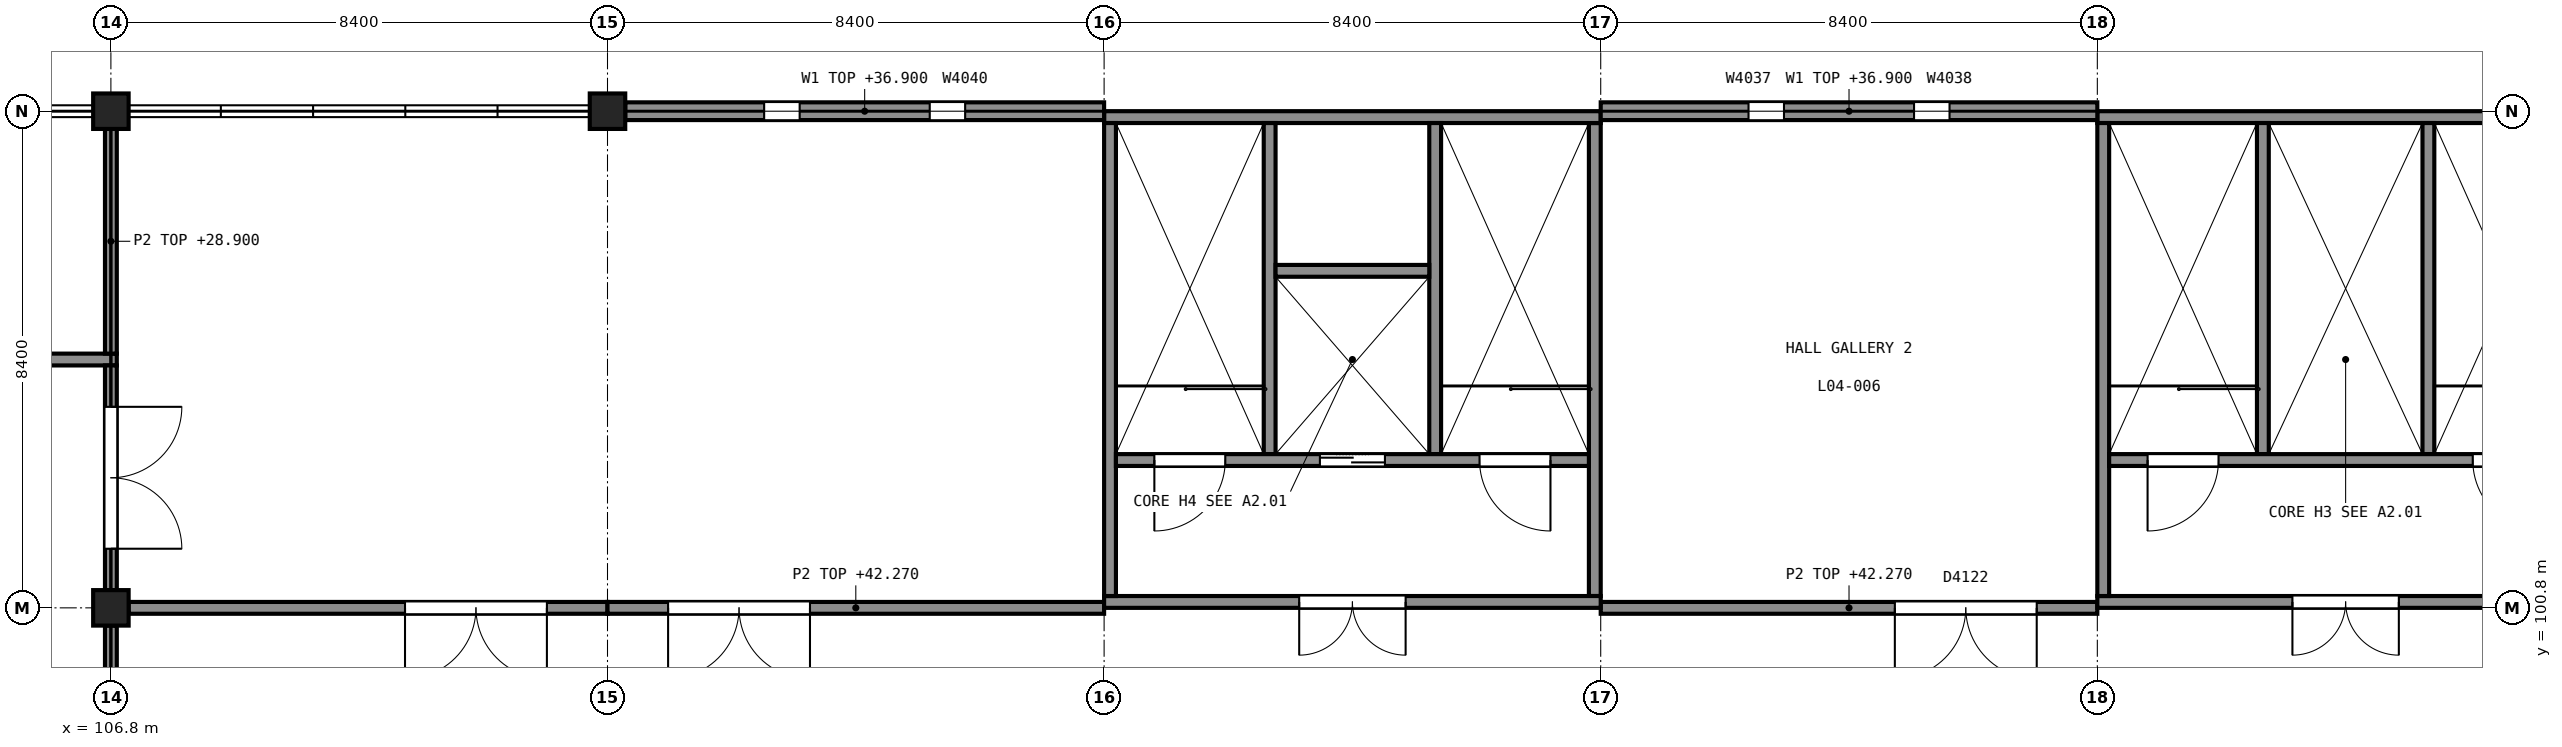
"""IFC4 building model, lengths in metres.
Left out: names, types, materials, properties, quantities, classifications, styles, units other than length and angle.
Written with IfcOpenShell. Run it as: python <this file> out.ifc"""

import sys

from ifc_helpers import new_model, si_unit, direction, frame, frame_2d, origin, origin_2d, place, context, subcontext, project, spatial, rectangle, extrude, element, fill, save


model = new_model("IFC4")
c1 = context("Model", 3, precision=1e-05, world=origin(), true_north=direction((0.0, 1.0)))
c2 = subcontext(c1, "Body", "Model", "MODEL_VIEW")
j1 = project(units=[si_unit("LENGTHUNIT", "METRE"), si_unit("PLANEANGLEUNIT", "RADIAN")], contexts=[c1])
p1 = place(None, origin())
s1 = spatial("IfcSite", under=j1, at=p1, CompositionType="ELEMENT")
p2 = place(p1, origin())
s2 = spatial("IfcBuilding", under=s1, at=p2, CompositionType="ELEMENT")
p3 = place(p2, frame((0.0, 0.0, 25.0)))
s3 = spatial("IfcBuildingStorey", under=s2, at=p3, CompositionType="ELEMENT", Elevation=25.0)
p4 = place(p3, frame((140.4, 100.9, 0.0), z_axis=(0.0, 0.0, 1.0), x_axis=(1.0, 0.0, 0.0)))
e1 = element("IfcWall", 1, at=p4, inside=s3, PredefinedType="SHEAR", context=c2, shape_type="SweptSolid", body=[
    extrude(rectangle(XDim=8.4, YDim=0.2, at=frame_2d((4.2, 0.0))), origin(), (0.0, 0.0, 1.0), 23.29),
])
p5 = place(p4, frame((3.3, 0.0, 0.0)))
e2 = element("IfcOpeningElement", 2, at=p5, cuts=e1, PredefinedType="OPENING", context=c2, shape_type="SweptSolid", body=[
    extrude(rectangle(XDim=1.8, YDim=2.1, at=frame_2d((0.9, 1.05))), frame((0.0, 0.11, 0.0), z_axis=(0.0, -1.0, 0.0), x_axis=(1.0, 0.0, 0.0)), (0.0, 0.0, 1.0), 0.22),
])
p6 = place(p3, frame((140.4, 109.1, 0.0), z_axis=(0.0, 0.0, 1.0), x_axis=(1.0, 0.0, 0.0)))
e3 = element("IfcWall", 3, at=p6, inside=s3, PredefinedType="SHEAR", context=c2, shape_type="SweptSolid", body=[
    extrude(rectangle(XDim=8.4, YDim=0.2, at=frame_2d((4.2, 0.0))), origin(), (0.0, 0.0, 1.0), 23.29),
])
p7 = place(p3, frame((140.5, 101.0, 0.0), z_axis=(0.0, 0.0, 1.0), x_axis=(0.0, 1.0, 0.0)))
e4 = element("IfcWall", 4, at=p7, inside=s3, PredefinedType="SHEAR", context=c2, shape_type="SweptSolid", body=[
    extrude(rectangle(XDim=8.0, YDim=0.2, at=frame_2d((4.0, 0.0))), origin(), (0.0, 0.0, 1.0), 23.29),
])
p8 = place(p3, frame((140.6, 103.3, 0.0), z_axis=(0.0, 0.0, 1.0), x_axis=(1.0, 0.0, 0.0)))
e5 = element("IfcWall", 5, at=p8, inside=s3, PredefinedType="SHEAR", context=c2, shape_type="SweptSolid", body=[
    extrude(rectangle(XDim=8.0, YDim=0.2, at=frame_2d((4.0, 0.0))), origin(), (0.0, 0.0, 1.0), 23.29),
])
p9 = place(p8, frame((0.65, 0.0, 0.0)))
e6 = element("IfcOpeningElement", 6, at=p9, cuts=e5, PredefinedType="OPENING", context=c2, shape_type="SweptSolid", body=[
    extrude(rectangle(XDim=1.2, YDim=2.1, at=frame_2d((0.6, 1.05))), frame((0.0, 0.11, 0.0), z_axis=(0.0, -1.0, 0.0), x_axis=(1.0, 0.0, 0.0)), (0.0, 0.0, 1.0), 0.22),
])
p10 = place(p8, frame((6.15, 0.0, 0.0)))
e7 = element("IfcOpeningElement", 7, at=p10, cuts=e5, PredefinedType="OPENING", context=c2, shape_type="SweptSolid", body=[
    extrude(rectangle(XDim=1.2, YDim=2.1, at=frame_2d((0.6, 1.05))), frame((0.0, 0.11, 0.0), z_axis=(0.0, -1.0, 0.0), x_axis=(1.0, 0.0, 0.0)), (0.0, 0.0, 1.0), 0.22),
])
for number, where, z_axis, x_axis in (
    (8, (143.2, 103.4, 0.0), (0.0, 0.0, 1.0), (0.0, 1.0, 0.0)),
    (9, (146.0, 103.4, 0.0), (0.0, 0.0, 1.0), (0.0, 1.0, 0.0)),
):
    element("IfcWall", number, at=place(p3, frame(where, z_axis=z_axis, x_axis=x_axis)), inside=s3, PredefinedType="SHEAR", context=c2, shape_type="SweptSolid", body=[
        extrude(rectangle(XDim=5.6, YDim=0.2, at=frame_2d((2.8, 0.0))), origin(), (0.0, 0.0, 1.0), 23.29),
    ])
p11 = place(p3, frame((123.6, 100.9, 0.0), z_axis=(0.0, 0.0, 1.0), x_axis=(1.0, 0.0, 0.0)))
e10 = element("IfcWall", 10, at=p11, inside=s3, PredefinedType="SHEAR", context=c2, shape_type="SweptSolid", body=[
    extrude(rectangle(XDim=8.4, YDim=0.2, at=frame_2d((4.2, 0.0))), origin(), (0.0, 0.0, 1.0), 23.29),
])
p12 = place(p11, frame((3.3, 0.0, 0.0)))
e11 = element("IfcOpeningElement", 11, at=p12, cuts=e10, PredefinedType="OPENING", context=c2, shape_type="SweptSolid", body=[
    extrude(rectangle(XDim=1.8, YDim=2.1, at=frame_2d((0.9, 1.05))), frame((0.0, 0.11, 0.0), z_axis=(0.0, -1.0, 0.0), x_axis=(1.0, 0.0, 0.0)), (0.0, 0.0, 1.0), 0.22),
])
p13 = place(p3, frame((123.6, 109.1, 0.0), z_axis=(0.0, 0.0, 1.0), x_axis=(1.0, 0.0, 0.0)))
e12 = element("IfcWall", 12, at=p13, inside=s3, PredefinedType="SHEAR", context=c2, shape_type="SweptSolid", body=[
    extrude(rectangle(XDim=8.4, YDim=0.2, at=frame_2d((4.2, 0.0))), origin(), (0.0, 0.0, 1.0), 23.29),
])
for number, where, z_axis, x_axis in (
    (13, (123.7, 101.0, 0.0), (0.0, 0.0, 1.0), (0.0, 1.0, 0.0)),
    (14, (131.9, 101.0, 0.0), (0.0, 0.0, 1.0), (0.0, 1.0, 0.0)),
):
    element("IfcWall", number, at=place(p3, frame(where, z_axis=z_axis, x_axis=x_axis)), inside=s3, PredefinedType="SHEAR", context=c2, shape_type="SweptSolid", body=[
        extrude(rectangle(XDim=8.0, YDim=0.2, at=frame_2d((4.0, 0.0))), origin(), (0.0, 0.0, 1.0), 23.29),
    ])
p14 = place(p3, frame((123.8, 103.3, 0.0), z_axis=(0.0, 0.0, 1.0), x_axis=(1.0, 0.0, 0.0)))
e15 = element("IfcWall", 15, at=p14, inside=s3, PredefinedType="SHEAR", context=c2, shape_type="SweptSolid", body=[
    extrude(rectangle(XDim=8.0, YDim=0.2, at=frame_2d((4.0, 0.0))), origin(), (0.0, 0.0, 1.0), 23.29),
])
p15 = place(p14, frame((0.65, 0.0, 0.0)))
e16 = element("IfcOpeningElement", 16, at=p15, cuts=e15, PredefinedType="OPENING", context=c2, shape_type="SweptSolid", body=[
    extrude(rectangle(XDim=1.2, YDim=2.1, at=frame_2d((0.6, 1.05))), frame((0.0, 0.11, 0.0), z_axis=(0.0, -1.0, 0.0), x_axis=(1.0, 0.0, 0.0)), (0.0, 0.0, 1.0), 0.22),
])
p16 = place(p14, frame((6.15, 0.0, 0.0)))
e17 = element("IfcOpeningElement", 17, at=p16, cuts=e15, PredefinedType="OPENING", context=c2, shape_type="SweptSolid", body=[
    extrude(rectangle(XDim=1.2, YDim=2.1, at=frame_2d((0.6, 1.05))), frame((0.0, 0.11, 0.0), z_axis=(0.0, -1.0, 0.0), x_axis=(1.0, 0.0, 0.0)), (0.0, 0.0, 1.0), 0.22),
])
p17 = place(p14, frame((3.45, 0.0, 0.0)))
e18 = element("IfcOpeningElement", 18, at=p17, cuts=e15, PredefinedType="OPENING", context=c2, shape_type="SweptSolid", body=[
    extrude(rectangle(XDim=1.1, YDim=2.1, at=frame_2d((0.55, 1.05))), frame((0.0, 0.11, 0.0), z_axis=(0.0, -1.0, 0.0), x_axis=(1.0, 0.0, 0.0)), (0.0, 0.0, 1.0), 0.22),
])
for number, where, z_axis, x_axis in (
    (19, (126.4, 103.4, 0.0), (0.0, 0.0, 1.0), (0.0, 1.0, 0.0)),
    (20, (129.2, 103.4, 0.0), (0.0, 0.0, 1.0), (0.0, 1.0, 0.0)),
):
    element("IfcWall", number, at=place(p3, frame(where, z_axis=z_axis, x_axis=x_axis)), inside=s3, PredefinedType="SHEAR", context=c2, shape_type="SweptSolid", body=[
        extrude(rectangle(XDim=5.6, YDim=0.2, at=frame_2d((2.8, 0.0))), origin(), (0.0, 0.0, 1.0), 23.29),
    ])
p18 = place(p3, frame((126.5, 106.5, 0.0), z_axis=(0.0, 0.0, 1.0), x_axis=(1.0, 0.0, 0.0)))
e21 = element("IfcWall", 21, at=p18, inside=s3, PredefinedType="SHEAR", context=c2, shape_type="SweptSolid", body=[
    extrude(rectangle(XDim=2.6, YDim=0.2, at=frame_2d((1.3, 0.0))), origin(), (0.0, 0.0, 1.0), 23.29),
])
for number, where, z_axis, x_axis in (
    (22, (106.8, 100.8, 0.0), (0.0, 0.0, 1.0), (1.0, 0.0, 0.0)),
    (23, (106.8, 109.2, 0.0), (0.0, 0.0, 1.0), (1.0, 0.0, 0.0)),
    (24, (115.2, 109.2, 0.0), (0.0, 0.0, 1.0), (1.0, 0.0, 0.0)),
):
    element("IfcColumn", number, at=place(p3, frame(where, z_axis=z_axis, x_axis=x_axis)), inside=s3, PredefinedType="COLUMN", context=c2, shape_type="SweptSolid", body=[
        extrude(rectangle(XDim=0.6, YDim=0.6, at=origin_2d()), origin(), (0.0, 0.0, 1.0), 5.0),
    ])
p19 = place(p3, frame((132.0, 109.2, 0.0), z_axis=(0.0, 0.0, 1.0), x_axis=(1.0, 0.0, 0.0)))
e25 = element("IfcWall", 25, at=p19, inside=s3, PredefinedType="SOLIDWALL", context=c2, shape_type="SweptSolid", body=[
    extrude(rectangle(XDim=8.4, YDim=0.3, at=frame_2d((4.2, 0.0))), origin(), (0.0, 0.0, 1.0), 11.9),
])
p20 = place(p19, frame((2.5, 0.0, 1.5)))
e26 = element("IfcOpeningElement", 26, at=p20, cuts=e25, PredefinedType="OPENING", context=c2, shape_type="SweptSolid", body=[
    extrude(rectangle(XDim=0.6, YDim=2.4, at=frame_2d((0.3, 1.2))), frame((0.0, 0.16, 0.0), z_axis=(0.0, -1.0, 0.0), x_axis=(1.0, 0.0, 0.0)), (0.0, 0.0, 1.0), 0.32),
])
p21 = place(p19, frame((5.3, 0.0, 1.5)))
e27 = element("IfcOpeningElement", 27, at=p21, cuts=e25, PredefinedType="OPENING", context=c2, shape_type="SweptSolid", body=[
    extrude(rectangle(XDim=0.6, YDim=2.4, at=frame_2d((0.3, 1.2))), frame((0.0, 0.16, 0.0), z_axis=(0.0, -1.0, 0.0), x_axis=(1.0, 0.0, 0.0)), (0.0, 0.0, 1.0), 0.32),
])
p22 = place(p3, frame((115.5, 109.2, 0.0), z_axis=(0.0, 0.0, 1.0), x_axis=(1.0, 0.0, 0.0)))
e28 = element("IfcWall", 28, at=p22, inside=s3, PredefinedType="SOLIDWALL", context=c2, shape_type="SweptSolid", body=[
    extrude(rectangle(XDim=8.1, YDim=0.3, at=frame_2d((4.05, 0.0))), origin(), (0.0, 0.0, 1.0), 11.9),
])
p23 = place(p22, frame((2.35, 0.0, 1.5)))
e29 = element("IfcOpeningElement", 29, at=p23, cuts=e28, PredefinedType="OPENING", context=c2, shape_type="SweptSolid", body=[
    extrude(rectangle(XDim=0.6, YDim=2.4, at=frame_2d((0.3, 1.2))), frame((0.0, 0.16, 0.0), z_axis=(0.0, -1.0, 0.0), x_axis=(1.0, 0.0, 0.0)), (0.0, 0.0, 1.0), 0.32),
])
p24 = place(p22, frame((5.15, 0.0, 1.5)))
e30 = element("IfcOpeningElement", 30, at=p24, cuts=e28, PredefinedType="OPENING", context=c2, shape_type="SweptSolid", body=[
    extrude(rectangle(XDim=0.6, YDim=2.4, at=frame_2d((0.3, 1.2))), frame((0.0, 0.16, 0.0), z_axis=(0.0, -1.0, 0.0), x_axis=(1.0, 0.0, 0.0)), (0.0, 0.0, 1.0), 0.32),
])
p25 = place(p3, frame((98.4, 105.0, 0.0), z_axis=(0.0, 0.0, 1.0), x_axis=(1.0, 0.0, 0.0)))
e31 = element("IfcWall", 31, at=p25, inside=s3, PredefinedType="PARTITIONING", context=c2, shape_type="SweptSolid", body=[
    extrude(rectangle(XDim=8.5, YDim=0.2, at=frame_2d((4.25, 0.0))), origin(), (0.0, 0.0, 1.0), 3.9),
])
p26 = place(p25, frame((1.6, 0.0, 0.0)))
e32 = element("IfcOpeningElement", 32, at=p26, cuts=e31, PredefinedType="OPENING", context=c2, shape_type="SweptSolid", body=[
    extrude(rectangle(XDim=1.0, YDim=2.1, at=frame_2d((0.5, 1.05))), frame((0.0, 0.11, 0.0), z_axis=(0.0, -1.0, 0.0), x_axis=(1.0, 0.0, 0.0)), (0.0, 0.0, 1.0), 0.22),
])
p27 = place(p25, frame((5.788, 0.0, 0.0)))
e33 = element("IfcOpeningElement", 33, at=p27, cuts=e31, PredefinedType="OPENING", context=c2, shape_type="SweptSolid", body=[
    extrude(rectangle(XDim=1.0, YDim=2.1, at=frame_2d((0.5, 1.05))), frame((0.0, 0.11, 0.0), z_axis=(0.0, -1.0, 0.0), x_axis=(1.0, 0.0, 0.0)), (0.0, 0.0, 1.0), 0.22),
])
p28 = place(p3, frame((106.8, 101.1, 0.0), z_axis=(0.0, 0.0, 1.0), x_axis=(0.0, 1.0, 0.0)))
e34 = element("IfcWall", 34, at=p28, inside=s3, PredefinedType="PARTITIONING", context=c2, shape_type="SweptSolid", body=[
    extrude(rectangle(XDim=3.8, YDim=0.2, at=frame_2d((1.9, 0.0))), origin(), (0.0, 0.0, 1.0), 3.9),
])
p29 = place(p28, frame((0.7, 0.0, 0.0)))
e35 = element("IfcOpeningElement", 35, at=p29, cuts=e34, PredefinedType="OPENING", context=c2, shape_type="SweptSolid", body=[
    extrude(rectangle(XDim=2.4, YDim=2.4, at=frame_2d((1.2, 1.2))), frame((0.0, 0.11, 0.0), z_axis=(0.0, -1.0, 0.0), x_axis=(1.0, 0.0, 0.0)), (0.0, 0.0, 1.0), 0.22),
])
p30 = place(p3, frame((106.8, 105.1, 0.0), z_axis=(0.0, 0.0, 1.0), x_axis=(0.0, 1.0, 0.0)))
e36 = element("IfcWall", 36, at=p30, inside=s3, PredefinedType="PARTITIONING", context=c2, shape_type="SweptSolid", body=[
    extrude(rectangle(XDim=3.8, YDim=0.2, at=frame_2d((1.9, 0.0))), origin(), (0.0, 0.0, 1.0), 3.9),
])
p31 = place(p3, frame((107.1, 100.8, 0.0), z_axis=(0.0, 0.0, 1.0), x_axis=(1.0, 0.0, 0.0)))
e37 = element("IfcWall", 37, at=p31, inside=s3, PredefinedType="PARTITIONING", context=c2, shape_type="SweptSolid", body=[
    extrude(rectangle(XDim=8.1, YDim=0.2, at=frame_2d((4.05, 0.0))), origin(), (0.0, 0.0, 1.0), 17.27),
])
p32 = place(p31, frame((4.675, 0.0, 0.0)))
e38 = element("IfcOpeningElement", 38, at=p32, cuts=e37, PredefinedType="OPENING", context=c2, shape_type="SweptSolid", body=[
    extrude(rectangle(XDim=2.4, YDim=2.4, at=frame_2d((1.2, 1.2))), frame((0.0, 0.11, 0.0), z_axis=(0.0, -1.0, 0.0), x_axis=(1.0, 0.0, 0.0)), (0.0, 0.0, 1.0), 0.22),
])
p33 = place(p3, frame((115.2, 100.8, 0.0), z_axis=(0.0, 0.0, 1.0), x_axis=(1.0, 0.0, 0.0)))
e39 = element("IfcWall", 39, at=p33, inside=s3, PredefinedType="PARTITIONING", context=c2, shape_type="SweptSolid", body=[
    extrude(rectangle(XDim=8.4, YDim=0.2, at=frame_2d((4.2, 0.0))), origin(), (0.0, 0.0, 1.0), 17.27),
])
p34 = place(p33, frame((1.025, 0.0, 0.0)))
e40 = element("IfcOpeningElement", 40, at=p34, cuts=e39, PredefinedType="OPENING", context=c2, shape_type="SweptSolid", body=[
    extrude(rectangle(XDim=2.4, YDim=2.4, at=frame_2d((1.2, 1.2))), frame((0.0, 0.11, 0.0), z_axis=(0.0, -1.0, 0.0), x_axis=(1.0, 0.0, 0.0)), (0.0, 0.0, 1.0), 0.22),
])
p35 = place(p3, frame((132.0, 100.8, 0.0), z_axis=(0.0, 0.0, 1.0), x_axis=(1.0, 0.0, 0.0)))
e41 = element("IfcWall", 41, at=p35, inside=s3, PredefinedType="PARTITIONING", context=c2, shape_type="SweptSolid", body=[
    extrude(rectangle(XDim=8.4, YDim=0.2, at=frame_2d((4.2, 0.0))), origin(), (0.0, 0.0, 1.0), 17.27),
])
p36 = place(p35, frame((4.975, 0.0, 0.0)))
e42 = element("IfcOpeningElement", 42, at=p36, cuts=e41, PredefinedType="OPENING", context=c2, shape_type="SweptSolid", body=[
    extrude(rectangle(XDim=2.4, YDim=2.4, at=frame_2d((1.2, 1.2))), frame((0.0, 0.11, 0.0), z_axis=(0.0, -1.0, 0.0), x_axis=(1.0, 0.0, 0.0)), (0.0, 0.0, 1.0), 0.22),
])
p37 = place(p3, frame((106.8, 92.7, 0.0), z_axis=(0.0, 0.0, 1.0), x_axis=(0.0, 1.0, 0.0)))
e43 = element("IfcWall", 43, at=p37, inside=s3, PredefinedType="PARTITIONING", context=c2, shape_type="SweptSolid", body=[
    extrude(rectangle(XDim=7.8, YDim=0.2, at=frame_2d((3.9, 0.0))), origin(), (0.0, 0.0, 1.0), 3.9),
])
p38 = place(p20, origin())
e44 = element("IfcWindow", 44, at=p38, inside=s3, PartitioningType="SINGLE_PANEL", PredefinedType="WINDOW", context=c2, shape_type="SweptSolid", body=[
    extrude(rectangle(XDim=0.6, YDim=2.4, at=frame_2d((0.3, 1.2))), frame((0.0, -0.07, 0.0), z_axis=(0.0, -1.0, 0.0), x_axis=(1.0, 0.0, 0.0)), (0.0, 0.0, 1.0), 0.06),
])
fill(e26, e44)
p39 = place(p21, origin())
e45 = element("IfcWindow", 45, at=p39, inside=s3, PartitioningType="SINGLE_PANEL", PredefinedType="WINDOW", context=c2, shape_type="SweptSolid", body=[
    extrude(rectangle(XDim=0.6, YDim=2.4, at=frame_2d((0.3, 1.2))), frame((0.0, -0.07, 0.0), z_axis=(0.0, -1.0, 0.0), x_axis=(1.0, 0.0, 0.0)), (0.0, 0.0, 1.0), 0.06),
])
fill(e27, e45)
p40 = place(p23, origin())
e46 = element("IfcWindow", 46, at=p40, inside=s3, PartitioningType="SINGLE_PANEL", PredefinedType="WINDOW", context=c2, shape_type="SweptSolid", body=[
    extrude(rectangle(XDim=0.6, YDim=2.4, at=frame_2d((0.3, 1.2))), frame((0.0, -0.07, 0.0), z_axis=(0.0, -1.0, 0.0), x_axis=(1.0, 0.0, 0.0)), (0.0, 0.0, 1.0), 0.06),
])
fill(e29, e46)
p41 = place(p24, origin())
e47 = element("IfcWindow", 47, at=p41, inside=s3, PartitioningType="SINGLE_PANEL", PredefinedType="WINDOW", context=c2, shape_type="SweptSolid", body=[
    extrude(rectangle(XDim=0.6, YDim=2.4, at=frame_2d((0.3, 1.2))), frame((0.0, -0.07, 0.0), z_axis=(0.0, -1.0, 0.0), x_axis=(1.0, 0.0, 0.0)), (0.0, 0.0, 1.0), 0.06),
])
fill(e30, e47)
p42 = place(p29, origin())
e48 = element("IfcDoor", 48, at=p42, inside=s3, OperationType="DOUBLE_DOOR_SINGLE_SWING", PredefinedType="DOOR", context=c2, shape_type="SweptSolid", body=[
    extrude(rectangle(XDim=2.4, YDim=2.4, at=frame_2d((1.2, 1.2))), frame((0.0, 0.025, 0.0), z_axis=(0.0, -1.0, 0.0), x_axis=(1.0, 0.0, 0.0)), (0.0, 0.0, 1.0), 0.05),
])
fill(e35, e48)
p43 = place(p32, origin())
e49 = element("IfcDoor", 49, at=p43, inside=s3, OperationType="DOUBLE_DOOR_SINGLE_SWING", PredefinedType="DOOR", context=c2, shape_type="SweptSolid", body=[
    extrude(rectangle(XDim=2.4, YDim=2.4, at=frame_2d((1.2, 1.2))), frame((0.0, 0.025, 0.0), z_axis=(0.0, -1.0, 0.0), x_axis=(1.0, 0.0, 0.0)), (0.0, 0.0, 1.0), 0.05),
])
fill(e38, e49)
p44 = place(p34, origin())
e50 = element("IfcDoor", 50, at=p44, inside=s3, OperationType="DOUBLE_DOOR_SINGLE_SWING", PredefinedType="DOOR", context=c2, shape_type="SweptSolid", body=[
    extrude(rectangle(XDim=2.4, YDim=2.4, at=frame_2d((1.2, 1.2))), frame((0.0, 0.025, 0.0), z_axis=(0.0, -1.0, 0.0), x_axis=(1.0, 0.0, 0.0)), (0.0, 0.0, 1.0), 0.05),
])
fill(e40, e50)
p45 = place(p36, origin())
e51 = element("IfcDoor", 51, at=p45, inside=s3, OperationType="DOUBLE_DOOR_SINGLE_SWING", PredefinedType="DOOR", context=c2, shape_type="SweptSolid", body=[
    extrude(rectangle(XDim=2.4, YDim=2.4, at=frame_2d((1.2, 1.2))), frame((0.0, 0.025, 0.0), z_axis=(0.0, -1.0, 0.0), x_axis=(1.0, 0.0, 0.0)), (0.0, 0.0, 1.0), 0.05),
])
fill(e42, e51)
p46 = place(p5, origin())
e52 = element("IfcDoor", 52, at=p46, inside=s3, OperationType="DOUBLE_DOOR_SINGLE_SWING", PredefinedType="DOOR", context=c2, shape_type="SweptSolid", body=[
    extrude(rectangle(XDim=1.8, YDim=2.1, at=frame_2d((0.9, 1.05))), frame((0.0, 0.025, 0.0), z_axis=(0.0, -1.0, 0.0), x_axis=(1.0, 0.0, 0.0)), (0.0, 0.0, 1.0), 0.05),
])
fill(e2, e52)
p47 = place(p9, origin())
e53 = element("IfcDoor", 53, at=p47, inside=s3, OperationType="SINGLE_SWING_LEFT", PredefinedType="DOOR", context=c2, shape_type="SweptSolid", body=[
    extrude(rectangle(XDim=1.2, YDim=2.1, at=frame_2d((0.6, 1.05))), frame((0.0, 0.025, 0.0), z_axis=(0.0, -1.0, 0.0), x_axis=(1.0, 0.0, 0.0)), (0.0, 0.0, 1.0), 0.05),
])
fill(e6, e53)
p48 = place(p10, origin())
e54 = element("IfcDoor", 54, at=p48, inside=s3, OperationType="SINGLE_SWING_RIGHT", PredefinedType="DOOR", context=c2, shape_type="SweptSolid", body=[
    extrude(rectangle(XDim=1.2, YDim=2.1, at=frame_2d((0.6, 1.05))), frame((0.0, 0.025, 0.0), z_axis=(0.0, -1.0, 0.0), x_axis=(1.0, 0.0, 0.0)), (0.0, 0.0, 1.0), 0.05),
])
fill(e7, e54)
p49 = place(p12, origin())
e55 = element("IfcDoor", 55, at=p49, inside=s3, OperationType="DOUBLE_DOOR_SINGLE_SWING", PredefinedType="DOOR", context=c2, shape_type="SweptSolid", body=[
    extrude(rectangle(XDim=1.8, YDim=2.1, at=frame_2d((0.9, 1.05))), frame((0.0, 0.025, 0.0), z_axis=(0.0, -1.0, 0.0), x_axis=(1.0, 0.0, 0.0)), (0.0, 0.0, 1.0), 0.05),
])
fill(e11, e55)
p50 = place(p15, origin())
e56 = element("IfcDoor", 56, at=p50, inside=s3, OperationType="SINGLE_SWING_LEFT", PredefinedType="DOOR", context=c2, shape_type="SweptSolid", body=[
    extrude(rectangle(XDim=1.2, YDim=2.1, at=frame_2d((0.6, 1.05))), frame((0.0, 0.025, 0.0), z_axis=(0.0, -1.0, 0.0), x_axis=(1.0, 0.0, 0.0)), (0.0, 0.0, 1.0), 0.05),
])
fill(e16, e56)
p51 = place(p16, origin())
e57 = element("IfcDoor", 57, at=p51, inside=s3, OperationType="SINGLE_SWING_RIGHT", PredefinedType="DOOR", context=c2, shape_type="SweptSolid", body=[
    extrude(rectangle(XDim=1.2, YDim=2.1, at=frame_2d((0.6, 1.05))), frame((0.0, 0.025, 0.0), z_axis=(0.0, -1.0, 0.0), x_axis=(1.0, 0.0, 0.0)), (0.0, 0.0, 1.0), 0.05),
])
fill(e17, e57)
p52 = place(p17, origin())
e58 = element("IfcDoor", 58, at=p52, inside=s3, OperationType="DOUBLE_DOOR_SLIDING", PredefinedType="DOOR", context=c2, shape_type="SweptSolid", body=[
    extrude(rectangle(XDim=1.1, YDim=2.1, at=frame_2d((0.55, 1.05))), frame((0.0, 0.025, 0.0), z_axis=(0.0, -1.0, 0.0), x_axis=(1.0, 0.0, 0.0)), (0.0, 0.0, 1.0), 0.05),
])
fill(e18, e58)
save(model, sys.argv[1])
